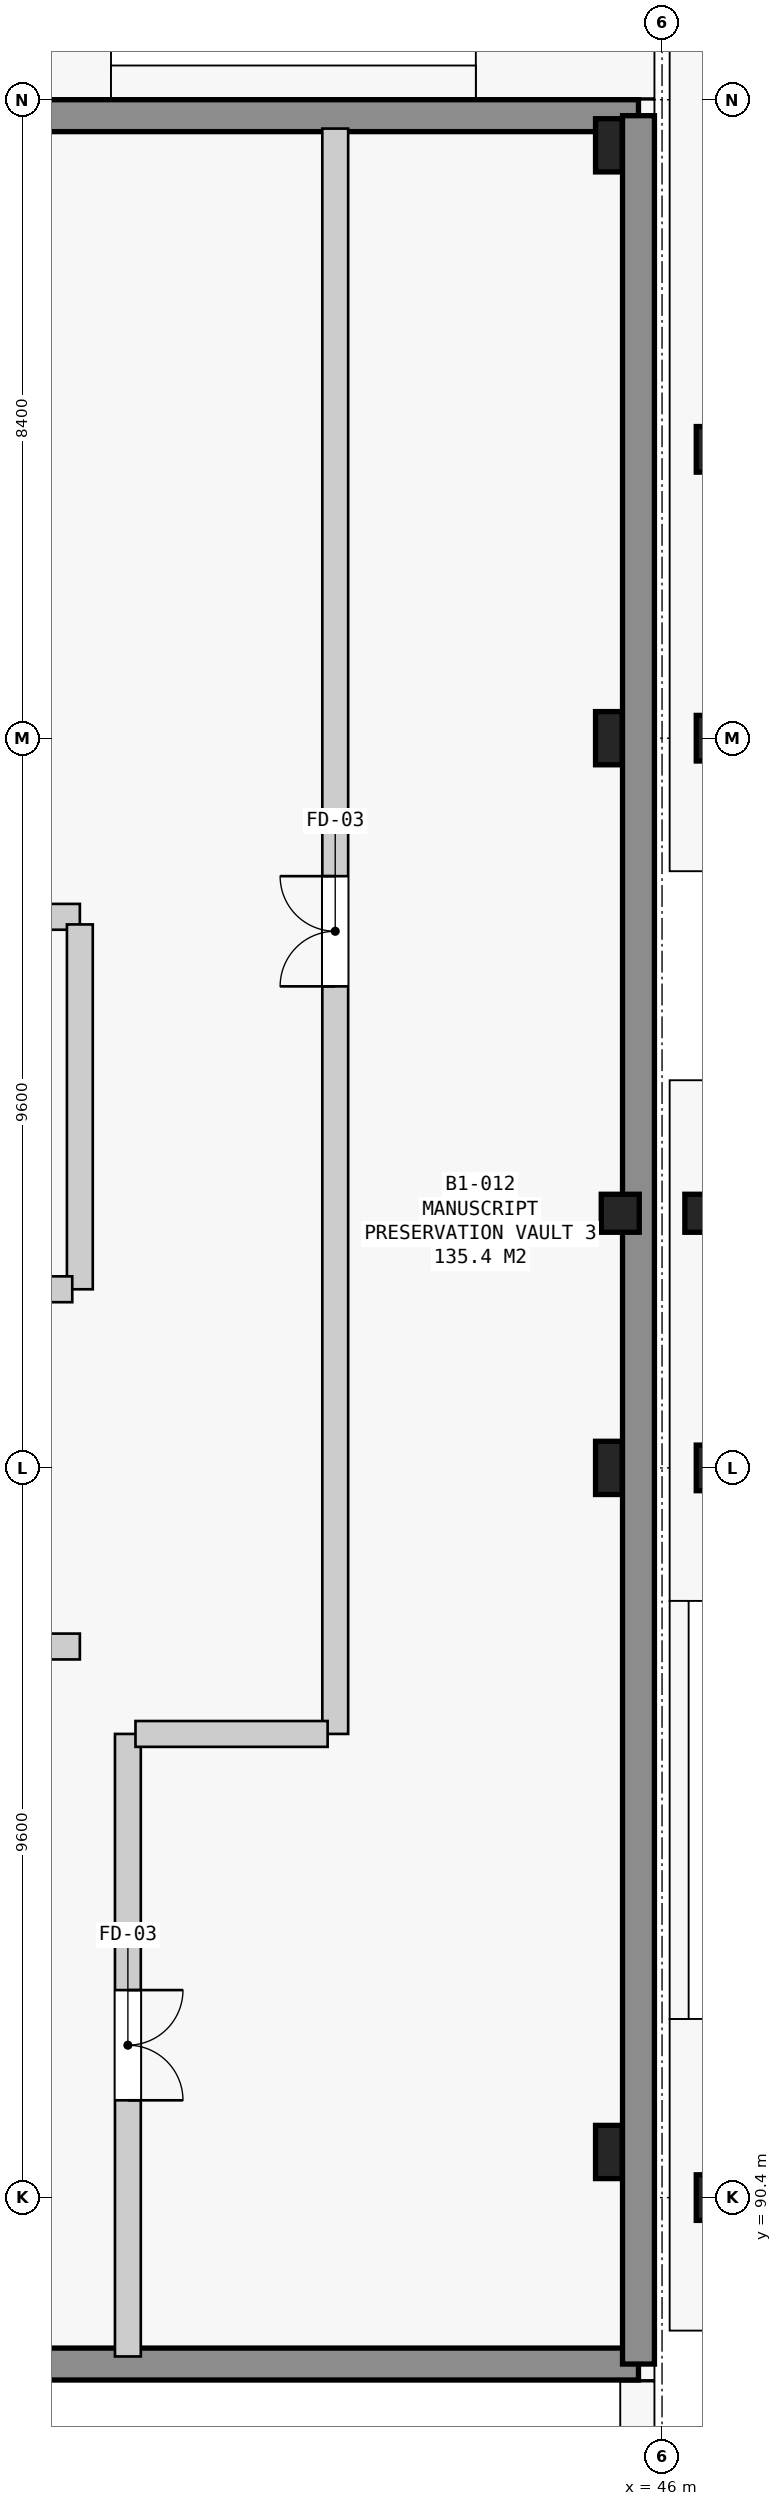
"""IFC4 building model, lengths in metres.
Left out: names, types, materials, properties, quantities, classifications, styles, units other than length and angle.
Written with IfcOpenShell. Run it as: python <this file> out.ifc"""

import sys

from ifc_helpers import new_model, si_unit, direction, frame, frame_2d, origin, origin_2d, place, context, subcontext, project, spatial, rectangle, extrude, element, fill, save


model = new_model("IFC4")
c1 = context("Model", 3, precision=1e-05, world=origin(), true_north=direction((0.0, 1.0)))
c2 = subcontext(c1, "Body", "Model", "MODEL_VIEW")
j1 = project(units=[si_unit("LENGTHUNIT", "METRE"), si_unit("PLANEANGLEUNIT", "RADIAN")], contexts=[c1])
p1 = place(None, origin())
s1 = spatial("IfcSite", under=j1, at=p1, CompositionType="ELEMENT")
p2 = place(p1, origin())
s2 = spatial("IfcBuilding", under=s1, at=p2, CompositionType="ELEMENT")
p3 = place(p2, frame((0.0, 0.0, -4.5)))
s3 = spatial("IfcBuildingStorey", under=s2, at=p3, CompositionType="ELEMENT", Elevation=-4.5)
for number, where, z_axis, x_axis in (
    (1, (45.3, 91.0, 0.0), (0.0, 0.0, 1.0), (1.0, 0.0, 0.0)),
    (2, (45.3, 100.0, 0.0), (0.0, 0.0, 1.0), (1.0, 0.0, 0.0)),
    (3, (45.3, 109.6, 0.0), (0.0, 0.0, 1.0), (1.0, 0.0, 0.0)),
    (4, (45.3, 117.4, 0.0), (0.0, 0.0, 1.0), (1.0, 0.0, 0.0)),
):
    element("IfcColumn", number, at=place(p3, frame(where, z_axis=z_axis, x_axis=x_axis)), inside=s3, PredefinedType="COLUMN", context=c2, shape_type="SweptSolid", body=[
        extrude(rectangle(XDim=0.35, YDim=0.7, at=origin_2d()), origin(), (0.0, 0.0, 1.0), 4.5),
    ])
for number, where, z_axis, x_axis in (
    (5, (45.45, 103.35, 0.0), (0.0, 0.0, 1.0), (1.0, 0.0, 0.0)),
    (6, (46.55, 103.35, 0.0), (0.0, 0.0, 1.0), (1.0, 0.0, 0.0)),
):
    element("IfcColumn", number, at=place(p3, frame(where, z_axis=z_axis, x_axis=x_axis)), inside=s3, PredefinedType="COLUMN", context=c2, shape_type="SweptSolid", body=[
        extrude(rectangle(XDim=0.5, YDim=0.5, at=origin_2d()), origin(), (0.0, 0.0, 1.0), 4.5),
    ])
for number, where, z_axis, x_axis in (
    (7, (46.75, 90.4, 0.0), (0.0, 0.0, 1.0), (1.0, 0.0, 0.0)),
    (8, (46.75, 100.0, 0.0), (0.0, 0.0, 1.0), (1.0, 0.0, 0.0)),
    (9, (46.75, 109.6, 0.0), (0.0, 0.0, 1.0), (1.0, 0.0, 0.0)),
    (10, (46.75, 113.4, 0.0), (0.0, 0.0, 1.0), (1.0, 0.0, 0.0)),
):
    element("IfcColumn", number, at=place(p3, frame(where, z_axis=z_axis, x_axis=x_axis)), inside=s3, PredefinedType="COLUMN", context=c2, shape_type="SweptSolid", body=[
        extrude(rectangle(XDim=0.6, YDim=0.6, at=origin_2d()), origin(), (0.0, 0.0, 1.0), 4.5),
    ])
for number, where, z_axis, x_axis in (
    (11, (45.69, 88.21, 0.0), (0.0, 0.0, 1.0), (-1.0, 0.0, 0.0)),
    (12, (12.61, 117.79, 0.0), (0.0, 0.0, 1.0), (1.0, 0.0, 0.0)),
):
    element("IfcWall", number, at=place(p3, frame(where, z_axis=z_axis, x_axis=x_axis)), inside=s3, PredefinedType="SOLIDWALL", context=c2, shape_type="SweptSolid", body=[
        extrude(rectangle(XDim=33.08, YDim=0.42, at=frame_2d((16.54, 0.0))), origin(), (0.0, 0.0, 1.0), 4.5),
    ])
p4 = place(p3, frame((45.69, 117.79, 0.0), z_axis=(0.0, 0.0, 1.0), x_axis=(0.0, -1.0, 0.0)))
e13 = element("IfcWall", 13, at=p4, inside=s3, PredefinedType="SOLIDWALL", context=c2, shape_type="SweptSolid", body=[
    extrude(rectangle(XDim=29.58, YDim=0.42, at=frame_2d((14.79, 0.0))), origin(), (0.0, 0.0, 1.0), 4.5),
])
p5 = place(p3, frame((34.4, 107.25, 0.0), z_axis=(0.0, 0.0, 1.0), x_axis=(1.0, 0.0, 0.0)))
e14 = element("IfcWall", 14, at=p5, inside=s3, PredefinedType="STANDARD", context=c2, shape_type="SweptSolid", body=[
    extrude(rectangle(XDim=3.94, YDim=0.34, at=frame_2d((1.97, 0.0))), origin(), (0.0, 0.0, 1.0), 3.23),
])
p6 = place(p3, frame((38.34, 107.15, 0.0), z_axis=(0.0, 0.0, 1.0), x_axis=(0.0, -1.0, 0.0)))
e15 = element("IfcWall", 15, at=p6, inside=s3, PredefinedType="STANDARD", context=c2, shape_type="SweptSolid", body=[
    extrude(rectangle(XDim=4.8, YDim=0.34, at=frame_2d((2.4, 0.0))), origin(), (0.0, 0.0, 1.0), 4.1),
])
p7 = place(p3, frame((38.24, 102.35, 0.0), z_axis=(0.0, 0.0, 1.0), x_axis=(-1.0, 0.0, 0.0)))
e16 = element("IfcWall", 16, at=p7, inside=s3, PredefinedType="STANDARD", context=c2, shape_type="SweptSolid", body=[
    extrude(rectangle(XDim=3.84, YDim=0.34, at=frame_2d((1.92, 0.0))), origin(), (0.0, 0.0, 1.0), 3.23),
])
p8 = place(p3, frame((34.75, 97.65, 0.0), z_axis=(0.0, 0.0, 1.0), x_axis=(1.0, 0.0, 0.0)))
e17 = element("IfcWall", 17, at=p8, inside=s3, PredefinedType="STANDARD", context=c2, shape_type="SweptSolid", body=[
    extrude(rectangle(XDim=3.59, YDim=0.34, at=frame_2d((1.795, 0.0))), origin(), (0.0, 0.0, 1.0), 3.28),
])
p9 = place(p3, frame((38.972, 96.5, 0.0), z_axis=(0.0, 0.0, 1.0), x_axis=(0.0, -1.0, 0.0)))
e18 = element("IfcWall", 18, at=p9, inside=s3, PredefinedType="STANDARD", context=c2, shape_type="SweptSolid", body=[
    extrude(rectangle(XDim=8.19, YDim=0.34, at=frame_2d((4.095, 0.0))), origin(), (0.0, 0.0, 1.0), 3.28),
])
p10 = place(p9, frame((3.37, 0.0, 0.0)))
e19 = element("IfcOpeningElement", 19, at=p10, cuts=e18, PredefinedType="OPENING", context=c2, shape_type="SweptSolid", body=[
    extrude(rectangle(XDim=1.45, YDim=2.2, at=frame_2d((0.725, 1.1))), frame((0.0, 0.18, 0.0), z_axis=(0.0, -1.0, 0.0), x_axis=(1.0, 0.0, 0.0)), (0.0, 0.0, 1.0), 0.36),
])
p11 = place(p3, frame((41.7, 96.5, 0.0), z_axis=(0.0, 0.0, 1.0), x_axis=(0.0, 1.0, 0.0)))
e20 = element("IfcWall", 20, at=p11, inside=s3, PredefinedType="STANDARD", context=c2, shape_type="SweptSolid", body=[
    extrude(rectangle(XDim=21.12, YDim=0.34, at=frame_2d((10.56, 0.0))), origin(), (0.0, 0.0, 1.0), 3.23),
])
p12 = place(p11, frame((9.835, 0.0, 0.0)))
e21 = element("IfcOpeningElement", 21, at=p12, cuts=e20, PredefinedType="OPENING", context=c2, shape_type="SweptSolid", body=[
    extrude(rectangle(XDim=1.45, YDim=2.2, at=frame_2d((0.725, 1.1))), frame((0.0, 0.18, 0.0), z_axis=(0.0, -1.0, 0.0), x_axis=(1.0, 0.0, 0.0)), (0.0, 0.0, 1.0), 0.36),
])
p13 = place(p3, frame((39.072, 96.5, 0.0), z_axis=(0.0, 0.0, 1.0), x_axis=(1.0, 0.0, 0.0)))
e22 = element("IfcWall", 22, at=p13, inside=s3, PredefinedType="STANDARD", context=c2, shape_type="SweptSolid", body=[
    extrude(rectangle(XDim=2.528, YDim=0.34, at=frame_2d((1.264, 0.0))), origin(), (0.0, 0.0, 1.0), 3.56),
])
p14 = place(p10, origin())
e23 = element("IfcDoor", 23, at=p14, inside=s3, OperationType="DOUBLE_DOOR_SINGLE_SWING", PredefinedType="DOOR", context=c2, shape_type="SweptSolid", body=[
    extrude(rectangle(XDim=1.45, YDim=2.2, at=frame_2d((0.725, 1.1))), frame((0.0, 0.025, 0.0), z_axis=(0.0, -1.0, 0.0), x_axis=(1.0, 0.0, 0.0)), (0.0, 0.0, 1.0), 0.05),
])
fill(e19, e23)
p15 = place(p12, origin())
e24 = element("IfcDoor", 24, at=p15, inside=s3, OperationType="DOUBLE_DOOR_SINGLE_SWING", PredefinedType="DOOR", context=c2, shape_type="SweptSolid", body=[
    extrude(rectangle(XDim=1.45, YDim=2.2, at=frame_2d((0.725, 1.1))), frame((0.0, 0.025, 0.0), z_axis=(0.0, -1.0, 0.0), x_axis=(1.0, 0.0, 0.0)), (0.0, 0.0, 1.0), 0.05),
])
fill(e21, e24)
save(model, sys.argv[1])
